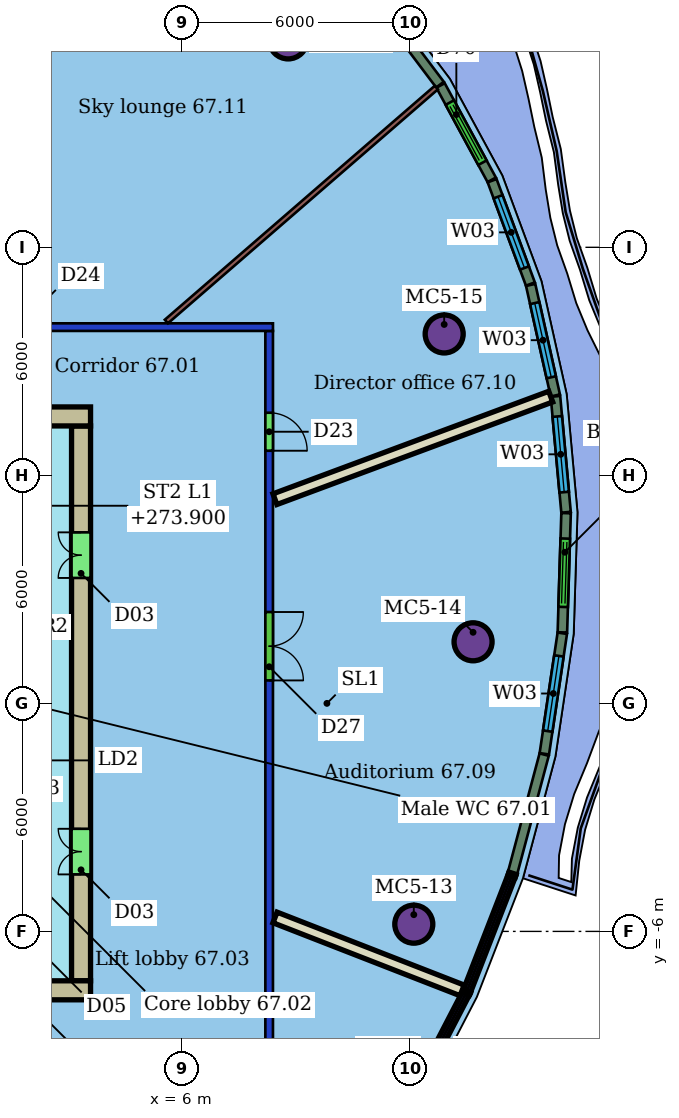
"""IFC4 building model, lengths in metres.
Left out: names, types, materials, properties, quantities, classifications, styles, units other than length and angle.
Written with IfcOpenShell. Run it as: python <this file> out.ifc"""

import sys

from ifc_helpers import new_model, si_unit, direction, frame, frame_2d, origin, origin_2d, place, context, subcontext, project, spatial, rectangle, hollow_circle, extrude, element, fill, save


model = new_model("IFC4")
c1 = context("Model", 3, precision=1e-05, world=origin(), true_north=direction((0.0, 1.0)))
c2 = subcontext(c1, "Body", "Model", "MODEL_VIEW")
j1 = project(units=[si_unit("LENGTHUNIT", "METRE"), si_unit("PLANEANGLEUNIT", "RADIAN")], contexts=[c1])
p1 = place(None, origin())
s1 = spatial("IfcSite", under=j1, at=p1, CompositionType="ELEMENT")
p2 = place(p1, origin())
s2 = spatial("IfcBuilding", under=s1, at=p2, CompositionType="ELEMENT")
p3 = place(p2, frame((0.0, 0.0, 272.1)))
s3 = spatial("IfcBuildingStorey", under=s2, at=p3, CompositionType="ELEMENT", Elevation=272.1)
for number, where, z_axis, x_axis in (
    (1, (12.106, -5.81, 0.0), (0.0, 0.0, 1.0), (1.0, 0.0, 0.0)),
    (2, (13.666, 1.62, 0.0), (0.0, 0.0, 1.0), (1.0, 0.0, 0.0)),
    (3, (12.906, 9.72, 0.0), (0.0, 0.0, 1.0), (1.0, 0.0, 0.0)),
    (4, (8.8, 17.457, 0.0), (0.0, 0.0, 1.0), (1.0, 0.0, 0.0)),
):
    element("IfcColumn", number, at=place(p3, frame(where, z_axis=z_axis, x_axis=x_axis)), inside=s3, PredefinedType="COLUMN", context=c2, shape_type="SweptSolid", body=[
        extrude(hollow_circle(Radius=0.5, WallThickness=0.04, at=origin_2d()), origin(), (0.0, 0.0, 1.0), 3.45),
    ])
p4 = place(p3, frame((-20.4, 9.9, 0.0), z_axis=(0.0, 0.0, 1.0), x_axis=(1.0, 0.0, 0.0)))
e5 = element("IfcWall", 5, at=p4, inside=s3, PredefinedType="PARTITIONING", context=c2, shape_type="SweptSolid", body=[
    extrude(rectangle(XDim=28.8, YDim=0.2, at=frame_2d((14.4, 0.0))), origin(), (0.0, 0.0, 1.0), 3.1),
])
p5 = place(p4, frame((16.626, 0.0, 0.0)))
e6 = element("IfcOpeningElement", 6, at=p5, cuts=e5, PredefinedType="OPENING", context=c2, shape_type="SweptSolid", body=[
    extrude(rectangle(XDim=1.5, YDim=2.4, at=frame_2d((0.75, 1.2))), frame((0.0, 0.11, 0.0), z_axis=(0.0, -1.0, 0.0), x_axis=(1.0, 0.0, 0.0)), (0.0, 0.0, 1.0), 0.22),
])
p6 = place(p4, frame((9.938, 0.0, 0.0)))
e7 = element("IfcOpeningElement", 7, at=p6, cuts=e5, PredefinedType="OPENING", context=c2, shape_type="SweptSolid", body=[
    extrude(rectangle(XDim=1.5, YDim=2.1, at=frame_2d((0.75, 1.05))), frame((0.0, 0.11, 0.0), z_axis=(0.0, -1.0, 0.0), x_axis=(1.0, 0.0, 0.0)), (0.0, 0.0, 1.0), 0.22),
])
p7 = place(p4, frame((20.758, 0.0, 0.0)))
e8 = element("IfcOpeningElement", 8, at=p7, cuts=e5, PredefinedType="OPENING", context=c2, shape_type="SweptSolid", body=[
    extrude(rectangle(XDim=1.5, YDim=2.1, at=frame_2d((0.75, 1.05))), frame((0.0, 0.11, 0.0), z_axis=(0.0, -1.0, 0.0), x_axis=(1.0, 0.0, 0.0)), (0.0, 0.0, 1.0), 0.22),
])
p8 = place(p3, frame((8.3, 9.8, 0.0), z_axis=(0.0, 0.0, 1.0), x_axis=(0.0, -1.0, 0.0)))
e9 = element("IfcWall", 9, at=p8, inside=s3, PredefinedType="PARTITIONING", context=c2, shape_type="SweptSolid", body=[
    extrude(rectangle(XDim=19.6, YDim=0.2, at=frame_2d((9.8, 0.0))), origin(), (0.0, 0.0, 1.0), 3.1),
])
p9 = place(p8, frame((7.396, 0.0, 0.0)))
e10 = element("IfcOpeningElement", 10, at=p9, cuts=e9, PredefinedType="OPENING", context=c2, shape_type="SweptSolid", body=[
    extrude(rectangle(XDim=1.8, YDim=2.4, at=frame_2d((0.9, 1.2))), frame((0.0, 0.11, 0.0), z_axis=(0.0, -1.0, 0.0), x_axis=(1.0, 0.0, 0.0)), (0.0, 0.0, 1.0), 0.22),
])
p10 = place(p8, frame((2.153, 0.0, 0.0)))
e11 = element("IfcOpeningElement", 11, at=p10, cuts=e9, PredefinedType="OPENING", context=c2, shape_type="SweptSolid", body=[
    extrude(rectangle(XDim=1.0, YDim=2.4, at=frame_2d((0.5, 1.2))), frame((0.0, 0.11, 0.0), z_axis=(0.0, -1.0, 0.0), x_axis=(1.0, 0.0, 0.0)), (0.0, 0.0, 1.0), 0.22),
])
p11 = place(p3, frame((4.438, 23.04, 0.0), z_axis=(0.0, 0.0, 1.0), x_axis=(-0.412668744216, -0.910881170926, 0.0)))
e12 = element("IfcWall", 12, at=p11, inside=s3, PredefinedType="PARTITIONING", context=c2, shape_type="SweptSolid", body=[
    extrude(rectangle(XDim=14.276, YDim=0.175, at=frame_2d((7.138, 0.0))), origin(), (0.0, 0.0, 1.0), 3.45),
])
p12 = place(p3, frame((13.378, -7.552, 0.0), z_axis=(0.0, 0.0, 1.0), x_axis=(-0.931738210827, 0.363130701656, 0.0)))
e13 = element("IfcWall", 13, at=p12, inside=s3, PredefinedType="PARTITIONING", context=c2, shape_type="SweptSolid", body=[
    extrude(rectangle(XDim=5.284, YDim=0.3, at=frame_2d((2.642, 0.0))), origin(), (0.0, 0.0, 1.0), 3.45),
])
p13 = place(p3, frame((15.709, 8.071, 0.0), z_axis=(0.0, 0.0, 1.0), x_axis=(-0.937315535256, -0.348481832193, 0.0)))
e14 = element("IfcWall", 14, at=p13, inside=s3, PredefinedType="PARTITIONING", context=c2, shape_type="SweptSolid", body=[
    extrude(rectangle(XDim=7.742, YDim=0.3, at=frame_2d((3.871, 0.0))), origin(), (0.0, 0.0, 1.0), 3.45),
])
p14 = place(p3, frame((12.698, 16.203, 0.0), z_axis=(0.0, 0.0, 1.0), x_axis=(-0.75573450221, -0.654878127723, 0.0)))
e15 = element("IfcWall", 15, at=p14, inside=s3, PredefinedType="PARTITIONING", context=c2, shape_type="SweptSolid", body=[
    extrude(rectangle(XDim=9.399, YDim=0.125, at=frame_2d((4.7, 0.0))), origin(), (0.0, 0.0, 1.0), 3.45),
])
p15 = place(p3, frame((14.708, -4.456, 0.0), z_axis=(0.0, 0.0, 1.0), x_axis=(0.257776035016, 0.96620469662, 0.0)))
e16 = element("IfcWall", 16, at=p15, inside=s3, PredefinedType="SOLIDWALL", context=c2, shape_type="SweptSolid", body=[
    extrude(rectangle(XDim=3.216, YDim=0.25, at=frame_2d((1.608, 0.0))), origin(), (0.0, 0.0, 1.0), 3.15),
])
p16 = place(p3, frame((15.541, -1.326, 0.0), z_axis=(0.0, 0.0, 1.0), x_axis=(0.147409564434, 0.989075538224, 0.0)))
e17 = element("IfcWall", 17, at=p16, inside=s3, PredefinedType="SOLIDWALL", context=c2, shape_type="SweptSolid", body=[
    extrude(rectangle(XDim=3.206, YDim=0.25, at=frame_2d((1.603, 0.0))), origin(), (0.0, 0.0, 1.0), 3.15),
])
p17 = place(p16, frame((0.603, 0.0, 0.9)))
e18 = element("IfcOpeningElement", 18, at=p17, cuts=e17, PredefinedType="OPENING", context=c2, shape_type="SweptSolid", body=[
    extrude(rectangle(XDim=2.0, YDim=2.1, at=frame_2d((1.0, 1.05))), frame((0.0, 0.135, 0.0), z_axis=(0.0, -1.0, 0.0), x_axis=(1.0, 0.0, 0.0)), (0.0, 0.0, 1.0), 0.27),
])
p18 = place(p3, frame((16.016, 1.868, 0.0), z_axis=(0.0, 0.0, 1.0), x_axis=(0.031030800892, 0.999518428743, 0.0)))
e19 = element("IfcWall", 19, at=p18, inside=s3, PredefinedType="SOLIDWALL", context=c2, shape_type="SweptSolid", body=[
    extrude(rectangle(XDim=3.139, YDim=0.25, at=frame_2d((1.57, 0.0))), origin(), (0.0, 0.0, 1.0), 3.15),
])
p19 = place(p18, frame((0.67, 0.0, 0.0)))
e20 = element("IfcOpeningElement", 20, at=p19, cuts=e19, PredefinedType="OPENING", context=c2, shape_type="SweptSolid", body=[
    extrude(rectangle(XDim=1.8, YDim=2.4, at=frame_2d((0.9, 1.2))), frame((0.0, 0.135, 0.0), z_axis=(0.0, -1.0, 0.0), x_axis=(1.0, 0.0, 0.0)), (0.0, 0.0, 1.0), 0.27),
])
p20 = place(p3, frame((16.112, 5.029, 0.0), z_axis=(0.0, 0.0, 1.0), x_axis=(-0.090974263514, 0.995853243896, 0.0)))
e21 = element("IfcWall", 21, at=p20, inside=s3, PredefinedType="SOLIDWALL", context=c2, shape_type="SweptSolid", body=[
    extrude(rectangle(XDim=3.062, YDim=0.25, at=frame_2d((1.531, 0.0))), origin(), (0.0, 0.0, 1.0), 3.15),
])
p21 = place(p20, frame((0.531, 0.0, 0.9)))
e22 = element("IfcOpeningElement", 22, at=p21, cuts=e21, PredefinedType="OPENING", context=c2, shape_type="SweptSolid", body=[
    extrude(rectangle(XDim=2.0, YDim=2.1, at=frame_2d((1.0, 1.05))), frame((0.0, 0.135, 0.0), z_axis=(0.0, -1.0, 0.0), x_axis=(1.0, 0.0, 0.0)), (0.0, 0.0, 1.0), 0.27),
])
p22 = place(p3, frame((15.83, 8.102, 0.0), z_axis=(0.0, 0.0, 1.0), x_axis=(-0.217728327431, 0.976009413599, 0.0)))
e23 = element("IfcWall", 23, at=p22, inside=s3, PredefinedType="SOLIDWALL", context=c2, shape_type="SweptSolid", body=[
    extrude(rectangle(XDim=2.98, YDim=0.25, at=frame_2d((1.49, 0.0))), origin(), (0.0, 0.0, 1.0), 3.15),
])
p23 = place(p22, frame((0.49, 0.0, 0.9)))
e24 = element("IfcOpeningElement", 24, at=p23, cuts=e23, PredefinedType="OPENING", context=c2, shape_type="SweptSolid", body=[
    extrude(rectangle(XDim=2.0, YDim=2.1, at=frame_2d((1.0, 1.05))), frame((0.0, 0.135, 0.0), z_axis=(0.0, -1.0, 0.0), x_axis=(1.0, 0.0, 0.0)), (0.0, 0.0, 1.0), 0.27),
])
p24 = place(p3, frame((15.174, 11.034, 0.0), z_axis=(0.0, 0.0, 1.0), x_axis=(-0.347382924833, 0.937723361943, 0.0)))
e25 = element("IfcWall", 25, at=p24, inside=s3, PredefinedType="SOLIDWALL", context=c2, shape_type="SweptSolid", body=[
    extrude(rectangle(XDim=2.899, YDim=0.25, at=frame_2d((1.45, 0.0))), origin(), (0.0, 0.0, 1.0), 3.15),
])
p25 = place(p24, frame((0.449, 0.0, 0.9)))
e26 = element("IfcOpeningElement", 26, at=p25, cuts=e25, PredefinedType="OPENING", context=c2, shape_type="SweptSolid", body=[
    extrude(rectangle(XDim=2.0, YDim=2.1, at=frame_2d((1.0, 1.05))), frame((0.0, 0.135, 0.0), z_axis=(0.0, -1.0, 0.0), x_axis=(1.0, 0.0, 0.0)), (0.0, 0.0, 1.0), 0.27),
])
p26 = place(p3, frame((14.156, 13.776, 0.0), z_axis=(0.0, 0.0, 1.0), x_axis=(-0.476845701511, 0.878987017509, 0.0)))
e27 = element("IfcWall", 27, at=p26, inside=s3, PredefinedType="SOLIDWALL", context=c2, shape_type="SweptSolid", body=[
    extrude(rectangle(XDim=2.824, YDim=0.25, at=frame_2d((1.412, 0.0))), origin(), (0.0, 0.0, 1.0), 3.15),
])
p27 = place(p26, frame((0.512, 0.0, 0.0)))
e28 = element("IfcOpeningElement", 28, at=p27, cuts=e27, PredefinedType="OPENING", context=c2, shape_type="SweptSolid", body=[
    extrude(rectangle(XDim=1.8, YDim=2.4, at=frame_2d((0.9, 1.2))), frame((0.0, 0.135, 0.0), z_axis=(0.0, -1.0, 0.0), x_axis=(1.0, 0.0, 0.0)), (0.0, 0.0, 1.0), 0.27),
])
p28 = place(p3, frame((12.796, 16.281, 0.0), z_axis=(0.0, 0.0, 1.0), x_axis=(-0.602094992284, 0.798424461215, 0.0)))
e29 = element("IfcWall", 29, at=p28, inside=s3, PredefinedType="SOLIDWALL", context=c2, shape_type="SweptSolid", body=[
    extrude(rectangle(XDim=2.719, YDim=0.25, at=frame_2d((1.36, 0.0))), origin(), (0.0, 0.0, 1.0), 3.15),
])
p29 = place(p3, frame((3.6, 7.55, 0.0), z_axis=(0.0, 0.0, 1.0), x_axis=(-1.0, 0.0, 0.0)))
e30 = element("IfcWall", 30, at=p29, inside=s3, PredefinedType="SHEAR", context=c2, shape_type="SweptSolid", body=[
    extrude(rectangle(XDim=9.6, YDim=0.5, at=frame_2d((4.8, 0.0))), origin(), (0.0, 0.0, 1.0), 3.3),
])
p30 = place(p29, frame((3.2, 0.0, 0.0)))
e31 = element("IfcOpeningElement", 31, at=p30, cuts=e30, PredefinedType="OPENING", context=c2, shape_type="SweptSolid", body=[
    extrude(rectangle(XDim=1.2, YDim=2.1, at=frame_2d((0.6, 1.05))), frame((0.0, 0.26, 0.0), z_axis=(0.0, -1.0, 0.0), x_axis=(1.0, 0.0, 0.0)), (0.0, 0.0, 1.0), 0.52),
])
p31 = place(p3, frame((-15.6, -7.55, 0.0), z_axis=(0.0, 0.0, 1.0), x_axis=(1.0, 0.0, 0.0)))
e32 = element("IfcWall", 32, at=p31, inside=s3, PredefinedType="SHEAR", context=c2, shape_type="SweptSolid", body=[
    extrude(rectangle(XDim=19.2, YDim=0.5, at=frame_2d((9.6, 0.0))), origin(), (0.0, 0.0, 1.0), 3.3),
])
p32 = place(p31, frame((3.6, 0.0, 0.0)))
e33 = element("IfcOpeningElement", 33, at=p32, cuts=e32, PredefinedType="OPENING", context=c2, shape_type="SweptSolid", body=[
    extrude(rectangle(XDim=1.2, YDim=2.1, at=frame_2d((0.6, 1.05))), frame((0.0, 0.26, 0.0), z_axis=(0.0, -1.0, 0.0), x_axis=(1.0, 0.0, 0.0)), (0.0, 0.0, 1.0), 0.52),
])
p33 = place(p3, frame((3.35, -7.3, 0.0), z_axis=(0.0, 0.0, 1.0), x_axis=(0.0, 1.0, 0.0)))
e34 = element("IfcWall", 34, at=p33, inside=s3, PredefinedType="SHEAR", context=c2, shape_type="SweptSolid", body=[
    extrude(rectangle(XDim=14.6, YDim=0.5, at=frame_2d((7.3, 0.0))), origin(), (0.0, 0.0, 1.0), 3.3),
])
p34 = place(p33, frame((2.8, 0.0, 0.0)))
e35 = element("IfcOpeningElement", 35, at=p34, cuts=e34, PredefinedType="OPENING", context=c2, shape_type="SweptSolid", body=[
    extrude(rectangle(XDim=1.2, YDim=2.1, at=frame_2d((0.6, 1.05))), frame((0.0, 0.26, 0.0), z_axis=(0.0, -1.0, 0.0), x_axis=(1.0, 0.0, 0.0)), (0.0, 0.0, 1.0), 0.52),
])
p35 = place(p33, frame((10.6, 0.0, 0.0)))
e36 = element("IfcOpeningElement", 36, at=p35, cuts=e34, PredefinedType="OPENING", context=c2, shape_type="SweptSolid", body=[
    extrude(rectangle(XDim=1.2, YDim=2.1, at=frame_2d((0.6, 1.05))), frame((0.0, 0.26, 0.0), z_axis=(0.0, -1.0, 0.0), x_axis=(1.0, 0.0, 0.0)), (0.0, 0.0, 1.0), 0.52),
])
p36 = place(p9, origin())
e37 = element("IfcDoor", 37, at=p36, inside=s3, OperationType="DOUBLE_DOOR_SINGLE_SWING", PredefinedType="DOOR", context=c2, shape_type="SweptSolid", body=[
    extrude(rectangle(XDim=1.8, YDim=2.4, at=frame_2d((0.9, 1.2))), frame((0.0, 0.025, 0.0), z_axis=(0.0, -1.0, 0.0), x_axis=(1.0, 0.0, 0.0)), (0.0, 0.0, 1.0), 0.05),
])
fill(e10, e37)
p37 = place(p10, origin())
e38 = element("IfcDoor", 38, at=p37, inside=s3, OperationType="SINGLE_SWING_RIGHT", PredefinedType="DOOR", context=c2, shape_type="SweptSolid", body=[
    extrude(rectangle(XDim=1.0, YDim=2.4, at=frame_2d((0.5, 1.2))), frame((0.0, 0.025, 0.0), z_axis=(0.0, -1.0, 0.0), x_axis=(1.0, 0.0, 0.0)), (0.0, 0.0, 1.0), 0.05),
])
fill(e11, e38)
p38 = place(p17, origin())
e39 = element("IfcWindow", 39, at=p38, inside=s3, PartitioningType="SINGLE_PANEL", PredefinedType="WINDOW", context=c2, shape_type="SweptSolid", body=[
    extrude(rectangle(XDim=2.0, YDim=2.1, at=frame_2d((1.0, 1.05))), frame((0.0, 0.03, 0.0), z_axis=(0.0, -1.0, 0.0), x_axis=(1.0, 0.0, 0.0)), (0.0, 0.0, 1.0), 0.06),
])
fill(e18, e39)
p39 = place(p19, origin())
e40 = element("IfcDoor", 40, at=p39, inside=s3, OperationType="DOUBLE_DOOR_SLIDING", PredefinedType="DOOR", context=c2, shape_type="SweptSolid", body=[
    extrude(rectangle(XDim=1.8, YDim=2.4, at=frame_2d((0.9, 1.2))), frame((0.0, 0.025, 0.0), z_axis=(0.0, -1.0, 0.0), x_axis=(1.0, 0.0, 0.0)), (0.0, 0.0, 1.0), 0.05),
])
fill(e20, e40)
p40 = place(p21, origin())
e41 = element("IfcWindow", 41, at=p40, inside=s3, PartitioningType="SINGLE_PANEL", PredefinedType="WINDOW", context=c2, shape_type="SweptSolid", body=[
    extrude(rectangle(XDim=2.0, YDim=2.1, at=frame_2d((1.0, 1.05))), frame((0.0, 0.03, 0.0), z_axis=(0.0, -1.0, 0.0), x_axis=(1.0, 0.0, 0.0)), (0.0, 0.0, 1.0), 0.06),
])
fill(e22, e41)
p41 = place(p23, origin())
e42 = element("IfcWindow", 42, at=p41, inside=s3, PartitioningType="SINGLE_PANEL", PredefinedType="WINDOW", context=c2, shape_type="SweptSolid", body=[
    extrude(rectangle(XDim=2.0, YDim=2.1, at=frame_2d((1.0, 1.05))), frame((0.0, 0.03, 0.0), z_axis=(0.0, -1.0, 0.0), x_axis=(1.0, 0.0, 0.0)), (0.0, 0.0, 1.0), 0.06),
])
fill(e24, e42)
p42 = place(p25, origin())
e43 = element("IfcWindow", 43, at=p42, inside=s3, PartitioningType="SINGLE_PANEL", PredefinedType="WINDOW", context=c2, shape_type="SweptSolid", body=[
    extrude(rectangle(XDim=2.0, YDim=2.1, at=frame_2d((1.0, 1.05))), frame((0.0, 0.03, 0.0), z_axis=(0.0, -1.0, 0.0), x_axis=(1.0, 0.0, 0.0)), (0.0, 0.0, 1.0), 0.06),
])
fill(e26, e43)
p43 = place(p27, origin())
e44 = element("IfcDoor", 44, at=p43, inside=s3, OperationType="DOUBLE_DOOR_SLIDING", PredefinedType="DOOR", context=c2, shape_type="SweptSolid", body=[
    extrude(rectangle(XDim=1.8, YDim=2.4, at=frame_2d((0.9, 1.2))), frame((0.0, 0.025, 0.0), z_axis=(0.0, -1.0, 0.0), x_axis=(1.0, 0.0, 0.0)), (0.0, 0.0, 1.0), 0.05),
])
fill(e28, e44)
p44 = place(p34, origin())
e45 = element("IfcDoor", 45, at=p44, inside=s3, OperationType="DOUBLE_DOOR_SINGLE_SWING", PredefinedType="NOTDEFINED", context=c2, shape_type="SweptSolid", body=[
    extrude(rectangle(XDim=1.2, YDim=2.1, at=frame_2d((0.6, 1.05))), frame((0.0, 0.025, 0.0), z_axis=(0.0, -1.0, 0.0), x_axis=(1.0, 0.0, 0.0)), (0.0, 0.0, 1.0), 0.05),
])
fill(e35, e45)
p45 = place(p35, origin())
e46 = element("IfcDoor", 46, at=p45, inside=s3, OperationType="DOUBLE_DOOR_SINGLE_SWING", PredefinedType="NOTDEFINED", context=c2, shape_type="SweptSolid", body=[
    extrude(rectangle(XDim=1.2, YDim=2.1, at=frame_2d((0.6, 1.05))), frame((0.0, 0.025, 0.0), z_axis=(0.0, -1.0, 0.0), x_axis=(1.0, 0.0, 0.0)), (0.0, 0.0, 1.0), 0.05),
])
fill(e36, e46)
save(model, sys.argv[1])
